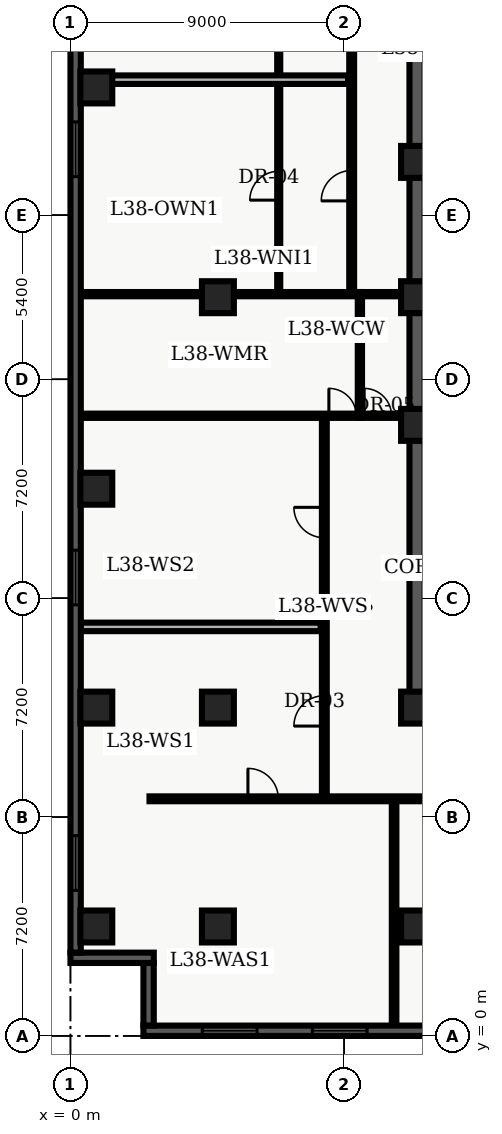
"""IFC4 building model, lengths in metres.
Left out: names, types, materials, properties, quantities, classifications, styles, units other than length and angle.
Written with IfcOpenShell. Run it as: python <this file> out.ifc"""

import sys

from ifc_helpers import new_model, entity, si_unit, converted_unit, direction, frame, origin_with_axes, origin_2d_with_axis, place, context, subcontext, project, spatial, polyline, rectangle, outline, extrude, element, fill, save


model = new_model("IFC4")
c1 = context("Model", 3, precision=1e-05, world=origin_with_axes(), true_north=direction((0.0, 1.0)))
c2 = subcontext(c1, "Body", "Model", "MODEL_VIEW")
j1 = project(units=[si_unit("LENGTHUNIT", "METRE"), converted_unit("PLANEANGLEUNIT", "DEGREE", entity("IfcPlaneAngleMeasure", 0.017), si_unit("PLANEANGLEUNIT", "RADIAN"), dimensions=[0, 0, 0, 0, 0, 0, 0])], contexts=[c1])
p1 = place(None, origin_with_axes())
s1 = spatial("IfcSite", under=j1, at=p1, CompositionType="ELEMENT")
p2 = place(p1, origin_with_axes())
s2 = spatial("IfcBuilding", under=s1, at=p2, CompositionType="ELEMENT")
p3 = place(p2, frame((0.0, 0.0, 156.3), z_axis=(0.0, 0.0, 1.0), x_axis=(1.0, 0.0, 0.0)))
s3 = spatial("IfcBuildingStorey", under=s2, at=p3, CompositionType="ELEMENT", Elevation=156.3)
p4 = place(p3, frame((11.4, 10.8, 0.0), z_axis=(0.0, 0.0, 1.0), x_axis=(0.0, 1.0, 0.0)))
e1 = element("IfcWall", 1, at=p4, inside=s3, PredefinedType="SHEAR", context=c2, shape_type="SweptSolid", body=[
    extrude(outline(polyline([(0.0, -0.25), (27.0, -0.25), (27.0, 0.25), (0.0, 0.25), (0.0, -0.25)])), origin_with_axes(), (0.0, 0.0, 1.0), 3.66),
])
p5 = place(p3, frame((11.4, 10.8, 0.0), z_axis=(0.0, 0.0, 1.0), x_axis=(1.0, 0.0, 0.0)))
e2 = element("IfcWall", 2, at=p5, inside=s3, PredefinedType="SHEAR", context=c2, shape_type="SweptSolid", body=[
    extrude(outline(polyline([(0.0, -0.25), (7.2, -0.25), (7.2, 0.25), (0.0, 0.25), (0.0, -0.25)])), origin_with_axes(), (0.0, 0.0, 1.0), 3.66),
])
p6 = place(p5, frame((2.625, 0.0, 0.0), z_axis=(0.0, 0.0, 1.0), x_axis=(1.0, 0.0, 0.0)))
e3 = element("IfcOpeningElement", 3, at=p6, cuts=e2, PredefinedType="OPENING", context=c2, shape_type="SweptSolid", body=[
    extrude(rectangle(XDim=1.05, YDim=0.52, at=origin_2d_with_axis()), origin_with_axes(), (0.0, 0.0, 1.0), 2.15),
])
for number, where, z_axis, x_axis in (
    (4, (11.4, 3.6, 0.0), (0.0, 0.0, 1.0), (1.0, 0.0, 0.0)),
    (5, (11.4, 10.8, 0.0), (0.0, 0.0, 1.0), (1.0, 0.0, 0.0)),
    (6, (11.4, 20.1, 0.0), (0.0, 0.0, 1.0), (1.0, 0.0, 0.0)),
    (7, (11.4, 24.3, 0.0), (0.0, 0.0, 1.0), (1.0, 0.0, 0.0)),
    (8, (11.4, 28.75, 0.0), (0.0, 0.0, 1.0), (1.0, 0.0, 0.0)),
    (9, (4.85, 3.6, 0.0), (0.0, 0.0, 1.0), (1.0, 0.0, 0.0)),
    (10, (4.85, 10.8, 0.0), (0.0, 0.0, 1.0), (1.0, 0.0, 0.0)),
    (11, (4.85, 24.3, 0.0), (0.0, 0.0, 1.0), (1.0, 0.0, 0.0)),
    (12, (0.85, 3.6, 0.0), (0.0, 0.0, 1.0), (1.0, 0.0, 0.0)),
    (13, (0.85, 10.8, 0.0), (0.0, 0.0, 1.0), (1.0, 0.0, 0.0)),
    (14, (0.85, 18.0, 0.0), (0.0, 0.0, 1.0), (1.0, 0.0, 0.0)),
    (15, (0.85, 31.2, 0.0), (0.0, 0.0, 1.0), (1.0, 0.0, 0.0)),
):
    element("IfcColumn", number, at=place(p3, frame(where, z_axis=z_axis, x_axis=x_axis)), inside=s3, PredefinedType="COLUMN", context=c2, shape_type="SweptSolid", body=[
        extrude(rectangle(XDim=1.05, YDim=1.05, at=origin_2d_with_axis()), origin_with_axes(), (0.0, 0.0, 1.0), 3.9),
    ])
p7 = place(p3, frame((9.52, 20.4, 0.0), z_axis=(0.0, 0.0, 1.0), x_axis=(0.0, 1.0, 0.0)))
e16 = element("IfcWall", 16, at=p7, inside=s3, PredefinedType="PARTITIONING", context=c2, shape_type="SweptSolid", body=[
    extrude(outline(polyline([(0.0, -0.07), (4.0, -0.07), (4.0, 0.07), (0.0, 0.07), (0.0, -0.07)])), origin_with_axes(), (0.0, 0.0, 1.0), 2.7),
])
p8 = place(p3, frame((9.52, 20.4, 0.0), z_axis=(0.0, 0.0, 1.0), x_axis=(1.0, 0.0, 0.0)))
e17 = element("IfcWall", 17, at=p8, inside=s3, PredefinedType="PARTITIONING", context=c2, shape_type="SweptSolid", body=[
    extrude(outline(polyline([(0.0, -0.07), (1.58, -0.07), (1.58, 0.07), (0.0, 0.07), (0.0, -0.07)])), origin_with_axes(), (0.0, 0.0, 1.0), 2.7),
])
p9 = place(p8, frame((0.59, 0.0, 0.0), z_axis=(0.0, 0.0, 1.0), x_axis=(1.0, 0.0, 0.0)))
e18 = element("IfcOpeningElement", 18, at=p9, cuts=e17, PredefinedType="OPENING", context=c2, shape_type="SweptSolid", body=[
    extrude(rectangle(XDim=0.9, YDim=0.16, at=origin_2d_with_axis()), origin_with_axes(), (0.0, 0.0, 1.0), 2.15),
])
p10 = place(p3, frame((9.52, 24.4, 0.0), z_axis=(0.0, 0.0, 1.0), x_axis=(1.0, 0.0, 0.0)))
e19 = element("IfcWall", 19, at=p10, inside=s3, PredefinedType="PARTITIONING", context=c2, shape_type="SweptSolid", body=[
    extrude(outline(polyline([(0.0, -0.07), (1.58, -0.07), (1.58, 0.07), (0.0, 0.07), (0.0, -0.07)])), origin_with_axes(), (0.0, 0.0, 1.0), 2.7),
])
p11 = place(p3, frame((2.6, 7.8, 0.0), z_axis=(0.0, 0.0, 1.0), x_axis=(1.0, 0.0, 0.0)))
e20 = element("IfcWall", 20, at=p11, inside=s3, PredefinedType="PARTITIONING", context=c2, shape_type="SweptSolid", body=[
    extrude(outline(polyline([(0.0, -0.08), (18.55, -0.08), (18.55, 0.08), (0.0, 0.08), (0.0, -0.08)])), origin_with_axes(), (0.0, 0.0, 1.0), 2.7),
])
p12 = place(p11, frame((3.737, 0.0, 0.0), z_axis=(0.0, 0.0, 1.0), x_axis=(1.0, 0.0, 0.0)))
e21 = element("IfcOpeningElement", 21, at=p12, cuts=e20, PredefinedType="OPENING", context=c2, shape_type="SweptSolid", body=[
    extrude(rectangle(XDim=1.0, YDim=0.18, at=origin_2d_with_axis()), origin_with_axes(), (0.0, 0.0, 1.0), 2.15),
])
p13 = place(p11, frame((13.273, 0.0, 0.0), z_axis=(0.0, 0.0, 1.0), x_axis=(1.0, 0.0, 0.0)))
e22 = element("IfcOpeningElement", 22, at=p13, cuts=e20, PredefinedType="OPENING", context=c2, shape_type="SweptSolid", body=[
    extrude(rectangle(XDim=1.0, YDim=0.18, at=origin_2d_with_axis()), origin_with_axes(), (0.0, 0.0, 1.0), 2.15),
])
p14 = place(p3, frame((8.35, 7.8, 0.0), z_axis=(0.0, 0.0, 1.0), x_axis=(0.0, 1.0, 0.0)))
e23 = element("IfcWall", 23, at=p14, inside=s3, PredefinedType="PARTITIONING", context=c2, shape_type="SweptSolid", body=[
    extrude(outline(polyline([(0.0, -0.08), (12.6, -0.08), (12.6, 0.08), (0.0, 0.08), (0.0, -0.08)])), origin_with_axes(), (0.0, 0.0, 1.0), 2.7),
])
p15 = place(p14, frame((2.893, 0.0, 0.0), z_axis=(0.0, 0.0, 1.0), x_axis=(1.0, 0.0, 0.0)))
e24 = element("IfcOpeningElement", 24, at=p15, cuts=e23, PredefinedType="OPENING", context=c2, shape_type="SweptSolid", body=[
    extrude(rectangle(XDim=1.0, YDim=0.18, at=origin_2d_with_axis()), origin_with_axes(), (0.0, 0.0, 1.0), 2.15),
])
p16 = place(p14, frame((9.088, 0.0, 0.0), z_axis=(0.0, 0.0, 1.0), x_axis=(1.0, 0.0, 0.0)))
e25 = element("IfcOpeningElement", 25, at=p16, cuts=e23, PredefinedType="OPENING", context=c2, shape_type="SweptSolid", body=[
    extrude(rectangle(XDim=1.0, YDim=0.18, at=origin_2d_with_axis()), origin_with_axes(), (0.0, 0.0, 1.0), 2.15),
])
p17 = place(p3, frame((9.25, 24.4, 0.0), z_axis=(0.0, 0.0, 1.0), x_axis=(0.0, 1.0, 0.0)))
e26 = element("IfcWall", 26, at=p17, inside=s3, PredefinedType="PARTITIONING", context=c2, shape_type="SweptSolid", body=[
    extrude(outline(polyline([(0.0, -0.08), (16.1, -0.08), (16.1, 0.08), (0.0, 0.08), (0.0, -0.08)])), origin_with_axes(), (0.0, 0.0, 1.0), 2.7),
])
p18 = place(p17, frame((3.567, 0.0, 0.0), z_axis=(0.0, 0.0, 1.0), x_axis=(1.0, 0.0, 0.0)))
e27 = element("IfcOpeningElement", 27, at=p18, cuts=e26, PredefinedType="OPENING", context=c2, shape_type="SweptSolid", body=[
    extrude(rectangle(XDim=1.0, YDim=0.18, at=origin_2d_with_axis()), origin_with_axes(), (0.0, 0.0, 1.0), 2.15),
])
p19 = place(p17, frame((11.512, 0.0, 0.0), z_axis=(0.0, 0.0, 1.0), x_axis=(1.0, 0.0, 0.0)))
e28 = element("IfcOpeningElement", 28, at=p19, cuts=e26, PredefinedType="OPENING", context=c2, shape_type="SweptSolid", body=[
    extrude(rectangle(XDim=1.0, YDim=0.18, at=origin_2d_with_axis()), origin_with_axes(), (0.0, 0.0, 1.0), 2.15),
])
p20 = place(p3, frame((0.335, 20.4, 0.0), z_axis=(0.0, 0.0, 1.0), x_axis=(1.0, 0.0, 0.0)))
e29 = element("IfcWall", 29, at=p20, inside=s3, PredefinedType="PARTITIONING", context=c2, shape_type="SweptSolid", body=[
    extrude(outline(polyline([(0.0, -0.07), (9.185, -0.07), (9.185, 0.07), (0.0, 0.07), (0.0, -0.07)])), origin_with_axes(), (0.0, 0.0, 1.0), 2.7),
])
p21 = place(p20, frame((8.615, 0.0, 0.0), z_axis=(0.0, 0.0, 1.0), x_axis=(1.0, 0.0, 0.0)))
e30 = element("IfcOpeningElement", 30, at=p21, cuts=e29, PredefinedType="OPENING", context=c2, shape_type="SweptSolid", body=[
    extrude(rectangle(XDim=0.9, YDim=0.16, at=origin_2d_with_axis()), origin_with_axes(), (0.0, 0.0, 1.0), 2.15),
])
p22 = place(p3, frame((0.335, 24.4, 0.0), z_axis=(0.0, 0.0, 1.0), x_axis=(1.0, 0.0, 0.0)))
e31 = element("IfcWall", 31, at=p22, inside=s3, PredefinedType="PARTITIONING", context=c2, shape_type="SweptSolid", body=[
    extrude(outline(polyline([(0.0, -0.07), (9.185, -0.07), (9.185, 0.07), (0.0, 0.07), (0.0, -0.07)])), origin_with_axes(), (0.0, 0.0, 1.0), 2.7),
])
p23 = place(p3, frame((0.335, 13.455, 0.0), z_axis=(0.0, 0.0, 1.0), x_axis=(1.0, 0.0, 0.0)))
e32 = element("IfcWall", 32, at=p23, inside=s3, PredefinedType="PARTITIONING", context=c2, shape_type="SweptSolid", body=[
    extrude(outline(polyline([(0.0, -0.14), (7.895, -0.14), (7.895, 0.14), (0.0, 0.14), (0.0, -0.14)])), origin_with_axes(), (0.0, 0.0, 1.0), 2.7),
])
p24 = place(p3, frame((6.85, 24.55, 0.0), z_axis=(0.0, 0.0, 1.0), x_axis=(0.0, 1.0, 0.0)))
e33 = element("IfcWall", 33, at=p24, inside=s3, PredefinedType="PARTITIONING", context=c2, shape_type="SweptSolid", body=[
    extrude(outline(polyline([(0.0, -0.05), (15.75, -0.05), (15.75, 0.05), (0.0, 0.05), (0.0, -0.05)])), origin_with_axes(), (0.0, 0.0, 1.0), 2.7),
])
p25 = place(p24, frame((3.417, 0.0, 0.0), z_axis=(0.0, 0.0, 1.0), x_axis=(1.0, 0.0, 0.0)))
e34 = element("IfcOpeningElement", 34, at=p25, cuts=e33, PredefinedType="OPENING", context=c2, shape_type="SweptSolid", body=[
    extrude(rectangle(XDim=0.95, YDim=0.12, at=origin_2d_with_axis()), origin_with_axes(), (0.0, 0.0, 1.0), 2.15),
])
p26 = place(p24, frame((11.082, 0.0, 0.0), z_axis=(0.0, 0.0, 1.0), x_axis=(1.0, 0.0, 0.0)))
e35 = element("IfcOpeningElement", 35, at=p26, cuts=e33, PredefinedType="OPENING", context=c2, shape_type="SweptSolid", body=[
    extrude(rectangle(XDim=0.95, YDim=0.12, at=origin_2d_with_axis()), origin_with_axes(), (0.0, 0.0, 1.0), 2.15),
])
p27 = place(p3, frame((0.335, 31.455, 0.0), z_axis=(0.0, 0.0, 1.0), x_axis=(1.0, 0.0, 0.0)))
e36 = element("IfcWall", 36, at=p27, inside=s3, PredefinedType="PARTITIONING", context=c2, shape_type="SweptSolid", body=[
    extrude(outline(polyline([(0.0, -0.14), (8.795, -0.14), (8.795, 0.14), (0.0, 0.14), (0.0, -0.14)])), origin_with_axes(), (0.0, 0.0, 1.0), 2.7),
])
p28 = place(p3, frame((10.645, 0.335, 0.0), z_axis=(0.0, 0.0, 1.0), x_axis=(0.0, 1.0, 0.0)))
e37 = element("IfcWall", 37, at=p28, inside=s3, PredefinedType="PARTITIONING", context=c2, shape_type="SweptSolid", body=[
    extrude(outline(polyline([(0.0, -0.075), (7.365, -0.075), (7.365, 0.075), (0.0, 0.075), (0.0, -0.075)])), origin_with_axes(), (0.0, 0.0, 1.0), 2.7),
])
p29 = place(p3, frame((57.26, 0.17, 0.0), z_axis=(0.0, 0.0, 1.0), x_axis=(-1.0, 0.0, 0.0)))
e38 = element("IfcWall", 38, at=p29, inside=s3, PredefinedType="SOLIDWALL", context=c2, shape_type="SweptSolid", body=[
    extrude(outline(polyline([(0.0, -0.17), (54.86, -0.17), (54.86, 0.17), (0.0, 0.17), (0.0, -0.17)])), origin_with_axes(), (0.0, 0.0, 1.0), 3.66),
])
p30 = place(p29, frame((2.836, 0.0, 0.45), z_axis=(0.0, 0.0, 1.0), x_axis=(1.0, 0.0, 0.0)))
e39 = element("IfcOpeningElement", 39, at=p30, cuts=e38, PredefinedType="OPENING", context=c2, shape_type="SweptSolid", body=[
    extrude(rectangle(XDim=1.8, YDim=0.36, at=origin_2d_with_axis()), origin_with_axes(), (0.0, 0.0, 1.0), 2.1),
])
p31 = place(p29, frame((7.307, 0.0, 0.45), z_axis=(0.0, 0.0, 1.0), x_axis=(1.0, 0.0, 0.0)))
e40 = element("IfcOpeningElement", 40, at=p31, cuts=e38, PredefinedType="OPENING", context=c2, shape_type="SweptSolid", body=[
    extrude(rectangle(XDim=1.8, YDim=0.36, at=origin_2d_with_axis()), origin_with_axes(), (0.0, 0.0, 1.0), 2.1),
])
p32 = place(p29, frame((11.779, 0.0, 0.45), z_axis=(0.0, 0.0, 1.0), x_axis=(1.0, 0.0, 0.0)))
e41 = element("IfcOpeningElement", 41, at=p32, cuts=e38, PredefinedType="OPENING", context=c2, shape_type="SweptSolid", body=[
    extrude(rectangle(XDim=1.8, YDim=0.36, at=origin_2d_with_axis()), origin_with_axes(), (0.0, 0.0, 1.0), 2.1),
])
p33 = place(p29, frame((16.251, 0.0, 0.45), z_axis=(0.0, 0.0, 1.0), x_axis=(1.0, 0.0, 0.0)))
e42 = element("IfcOpeningElement", 42, at=p33, cuts=e38, PredefinedType="OPENING", context=c2, shape_type="SweptSolid", body=[
    extrude(rectangle(XDim=1.8, YDim=0.36, at=origin_2d_with_axis()), origin_with_axes(), (0.0, 0.0, 1.0), 2.1),
])
p34 = place(p29, frame((20.723, 0.0, 0.45), z_axis=(0.0, 0.0, 1.0), x_axis=(1.0, 0.0, 0.0)))
e43 = element("IfcOpeningElement", 43, at=p34, cuts=e38, PredefinedType="OPENING", context=c2, shape_type="SweptSolid", body=[
    extrude(rectangle(XDim=1.8, YDim=0.36, at=origin_2d_with_axis()), origin_with_axes(), (0.0, 0.0, 1.0), 2.1),
])
p35 = place(p29, frame((25.194, 0.0, 0.45), z_axis=(0.0, 0.0, 1.0), x_axis=(1.0, 0.0, 0.0)))
e44 = element("IfcOpeningElement", 44, at=p35, cuts=e38, PredefinedType="OPENING", context=c2, shape_type="SweptSolid", body=[
    extrude(rectangle(XDim=1.8, YDim=0.36, at=origin_2d_with_axis()), origin_with_axes(), (0.0, 0.0, 1.0), 2.1),
])
p36 = place(p29, frame((29.666, 0.0, 0.45), z_axis=(0.0, 0.0, 1.0), x_axis=(1.0, 0.0, 0.0)))
e45 = element("IfcOpeningElement", 45, at=p36, cuts=e38, PredefinedType="OPENING", context=c2, shape_type="SweptSolid", body=[
    extrude(rectangle(XDim=1.8, YDim=0.36, at=origin_2d_with_axis()), origin_with_axes(), (0.0, 0.0, 1.0), 2.1),
])
p37 = place(p29, frame((34.138, 0.0, 0.45), z_axis=(0.0, 0.0, 1.0), x_axis=(1.0, 0.0, 0.0)))
e46 = element("IfcOpeningElement", 46, at=p37, cuts=e38, PredefinedType="OPENING", context=c2, shape_type="SweptSolid", body=[
    extrude(rectangle(XDim=1.8, YDim=0.36, at=origin_2d_with_axis()), origin_with_axes(), (0.0, 0.0, 1.0), 2.1),
])
p38 = place(p29, frame((38.609, 0.0, 0.45), z_axis=(0.0, 0.0, 1.0), x_axis=(1.0, 0.0, 0.0)))
e47 = element("IfcOpeningElement", 47, at=p38, cuts=e38, PredefinedType="OPENING", context=c2, shape_type="SweptSolid", body=[
    extrude(rectangle(XDim=1.8, YDim=0.36, at=origin_2d_with_axis()), origin_with_axes(), (0.0, 0.0, 1.0), 2.1),
])
p39 = place(p29, frame((43.081, 0.0, 0.45), z_axis=(0.0, 0.0, 1.0), x_axis=(1.0, 0.0, 0.0)))
e48 = element("IfcOpeningElement", 48, at=p39, cuts=e38, PredefinedType="OPENING", context=c2, shape_type="SweptSolid", body=[
    extrude(rectangle(XDim=1.8, YDim=0.36, at=origin_2d_with_axis()), origin_with_axes(), (0.0, 0.0, 1.0), 2.1),
])
p40 = place(p29, frame((48.403, 0.0, 0.45), z_axis=(0.0, 0.0, 1.0), x_axis=(1.0, 0.0, 0.0)))
e49 = element("IfcOpeningElement", 49, at=p40, cuts=e38, PredefinedType="OPENING", context=c2, shape_type="SweptSolid", body=[
    extrude(rectangle(XDim=1.8, YDim=0.36, at=origin_2d_with_axis()), origin_with_axes(), (0.0, 0.0, 1.0), 2.1),
])
p41 = place(p29, frame((52.024, 0.0, 0.45), z_axis=(0.0, 0.0, 1.0), x_axis=(1.0, 0.0, 0.0)))
e50 = element("IfcOpeningElement", 50, at=p41, cuts=e38, PredefinedType="OPENING", context=c2, shape_type="SweptSolid", body=[
    extrude(rectangle(XDim=1.8, YDim=0.36, at=origin_2d_with_axis()), origin_with_axes(), (0.0, 0.0, 1.0), 2.1),
])
p42 = place(p3, frame((2.57, 0.34, 0.0), z_axis=(0.0, 0.0, 1.0), x_axis=(0.0, 1.0, 0.0)))
e51 = element("IfcWall", 51, at=p42, inside=s3, PredefinedType="SOLIDWALL", context=c2, shape_type="SweptSolid", body=[
    extrude(outline(polyline([(0.0, -0.17), (2.06, -0.17), (2.06, 0.17), (0.0, 0.17), (0.0, -0.17)])), origin_with_axes(), (0.0, 0.0, 1.0), 3.66),
])
p43 = place(p3, frame((2.74, 2.57, 0.0), z_axis=(0.0, 0.0, 1.0), x_axis=(-1.0, 0.0, 0.0)))
e52 = element("IfcWall", 52, at=p43, inside=s3, PredefinedType="SOLIDWALL", context=c2, shape_type="SweptSolid", body=[
    extrude(outline(polyline([(0.0, -0.17), (2.74, -0.17), (2.74, 0.17), (0.0, 0.17), (0.0, -0.17)])), origin_with_axes(), (0.0, 0.0, 1.0), 3.66),
])
p44 = place(p3, frame((0.17, 2.74, 0.0), z_axis=(0.0, 0.0, 1.0), x_axis=(0.0, 1.0, 0.0)))
e53 = element("IfcWall", 53, at=p44, inside=s3, PredefinedType="SOLIDWALL", context=c2, shape_type="SweptSolid", body=[
    extrude(outline(polyline([(0.0, -0.17), (43.46, -0.17), (43.46, 0.17), (0.0, 0.17), (0.0, -0.17)])), origin_with_axes(), (0.0, 0.0, 1.0), 3.66),
])
p45 = place(p44, frame((2.948, 0.0, 0.45), z_axis=(0.0, 0.0, 1.0), x_axis=(1.0, 0.0, 0.0)))
e54 = element("IfcOpeningElement", 54, at=p45, cuts=e53, PredefinedType="OPENING", context=c2, shape_type="SweptSolid", body=[
    extrude(rectangle(XDim=1.8, YDim=0.36, at=origin_2d_with_axis()), origin_with_axes(), (0.0, 0.0, 1.0), 2.1),
])
p46 = place(p44, frame((12.339, 0.0, 0.45), z_axis=(0.0, 0.0, 1.0), x_axis=(1.0, 0.0, 0.0)))
e55 = element("IfcOpeningElement", 55, at=p46, cuts=e53, PredefinedType="OPENING", context=c2, shape_type="SweptSolid", body=[
    extrude(rectangle(XDim=1.8, YDim=0.36, at=origin_2d_with_axis()), origin_with_axes(), (0.0, 0.0, 1.0), 2.1),
])
p47 = place(p44, frame((26.426, 0.0, 0.45), z_axis=(0.0, 0.0, 1.0), x_axis=(1.0, 0.0, 0.0)))
e56 = element("IfcOpeningElement", 56, at=p47, cuts=e53, PredefinedType="OPENING", context=c2, shape_type="SweptSolid", body=[
    extrude(rectangle(XDim=1.8, YDim=0.36, at=origin_2d_with_axis()), origin_with_axes(), (0.0, 0.0, 1.0), 2.1),
])
p48 = place(p44, frame((31.121, 0.0, 0.45), z_axis=(0.0, 0.0, 1.0), x_axis=(1.0, 0.0, 0.0)))
e57 = element("IfcOpeningElement", 57, at=p48, cuts=e53, PredefinedType="OPENING", context=c2, shape_type="SweptSolid", body=[
    extrude(rectangle(XDim=1.8, YDim=0.36, at=origin_2d_with_axis()), origin_with_axes(), (0.0, 0.0, 1.0), 2.1),
])
p49 = place(p44, frame((40.062, 0.0, 0.45), z_axis=(0.0, 0.0, 1.0), x_axis=(1.0, 0.0, 0.0)))
e58 = element("IfcOpeningElement", 58, at=p49, cuts=e53, PredefinedType="OPENING", context=c2, shape_type="SweptSolid", body=[
    extrude(rectangle(XDim=1.8, YDim=0.36, at=origin_2d_with_axis()), origin_with_axes(), (0.0, 0.0, 1.0), 2.1),
])
p50 = place(p8, frame((0.59, 0.0, 0.0), z_axis=(0.0, 0.0, 1.0), x_axis=(1.0, 0.0, 0.0)))
e59 = element("IfcDoor", 59, at=p50, inside=s3, OperationType="SINGLE_SWING_LEFT", PredefinedType="DOOR", context=c2, shape_type="SweptSolid", body=[
    extrude(rectangle(XDim=0.9, YDim=0.084, at=origin_2d_with_axis()), origin_with_axes(), (0.0, 0.0, 1.0), 2.15),
])
fill(e18, e59)
p51 = place(p20, frame((8.615, 0.0, 0.0), z_axis=(0.0, 0.0, 1.0), x_axis=(1.0, 0.0, 0.0)))
e60 = element("IfcDoor", 60, at=p51, inside=s3, OperationType="SINGLE_SWING_LEFT", PredefinedType="DOOR", context=c2, shape_type="SweptSolid", body=[
    extrude(rectangle(XDim=0.9, YDim=0.084, at=origin_2d_with_axis()), origin_with_axes(), (0.0, 0.0, 1.0), 2.15),
])
fill(e30, e60)
p52 = place(p14, frame((2.893, 0.0, 0.0), z_axis=(0.0, 0.0, 1.0), x_axis=(1.0, 0.0, 0.0)))
e61 = element("IfcDoor", 61, at=p52, inside=s3, OperationType="SINGLE_SWING_LEFT", PredefinedType="DOOR", context=c2, shape_type="SweptSolid", body=[
    extrude(rectangle(XDim=1.0, YDim=0.09, at=origin_2d_with_axis()), origin_with_axes(), (0.0, 0.0, 1.0), 2.15),
])
fill(e24, e61)
p53 = place(p14, frame((9.088, 0.0, 0.0), z_axis=(0.0, 0.0, 1.0), x_axis=(1.0, 0.0, 0.0)))
e62 = element("IfcDoor", 62, at=p53, inside=s3, OperationType="SINGLE_SWING_RIGHT", PredefinedType="DOOR", context=c2, shape_type="SweptSolid", body=[
    extrude(rectangle(XDim=1.0, YDim=0.09, at=origin_2d_with_axis()), origin_with_axes(), (0.0, 0.0, 1.0), 2.15),
])
fill(e25, e62)
p54 = place(p24, frame((3.417, 0.0, 0.0), z_axis=(0.0, 0.0, 1.0), x_axis=(1.0, 0.0, 0.0)))
e63 = element("IfcDoor", 63, at=p54, inside=s3, OperationType="SINGLE_SWING_LEFT", PredefinedType="DOOR", context=c2, shape_type="SweptSolid", body=[
    extrude(rectangle(XDim=0.95, YDim=0.06, at=origin_2d_with_axis()), origin_with_axes(), (0.0, 0.0, 1.0), 2.15),
])
fill(e34, e63)
p55 = place(p17, frame((3.567, 0.0, 0.0), z_axis=(0.0, 0.0, 1.0), x_axis=(1.0, 0.0, 0.0)))
e64 = element("IfcDoor", 64, at=p55, inside=s3, OperationType="SINGLE_SWING_LEFT", PredefinedType="DOOR", context=c2, shape_type="SweptSolid", body=[
    extrude(rectangle(XDim=1.0, YDim=0.09, at=origin_2d_with_axis()), origin_with_axes(), (0.0, 0.0, 1.0), 2.15),
])
fill(e27, e64)
p56 = place(p11, frame((3.737, 0.0, 0.0), z_axis=(0.0, 0.0, 1.0), x_axis=(1.0, 0.0, 0.0)))
e65 = element("IfcDoor", 65, at=p56, inside=s3, OperationType="SINGLE_SWING_LEFT", PredefinedType="DOOR", context=c2, shape_type="SweptSolid", body=[
    extrude(rectangle(XDim=1.0, YDim=0.09, at=origin_2d_with_axis()), origin_with_axes(), (0.0, 0.0, 1.0), 2.15),
])
fill(e21, e65)
p57 = place(p29, frame((48.403, 0.0, 0.45), z_axis=(0.0, 0.0, 1.0), x_axis=(1.0, 0.0, 0.0)))
e66 = element("IfcWindow", 66, at=p57, inside=s3, PredefinedType="WINDOW", context=c2, shape_type="SweptSolid", body=[
    extrude(rectangle(XDim=1.8, YDim=0.09, at=origin_2d_with_axis()), origin_with_axes(), (0.0, 0.0, 1.0), 2.1),
])
fill(e49, e66)
p58 = place(p29, frame((52.024, 0.0, 0.45), z_axis=(0.0, 0.0, 1.0), x_axis=(1.0, 0.0, 0.0)))
e67 = element("IfcWindow", 67, at=p58, inside=s3, PredefinedType="WINDOW", context=c2, shape_type="SweptSolid", body=[
    extrude(rectangle(XDim=1.8, YDim=0.09, at=origin_2d_with_axis()), origin_with_axes(), (0.0, 0.0, 1.0), 2.1),
])
fill(e50, e67)
p59 = place(p44, frame((2.948, 0.0, 0.45), z_axis=(0.0, 0.0, 1.0), x_axis=(1.0, 0.0, 0.0)))
e68 = element("IfcWindow", 68, at=p59, inside=s3, PredefinedType="WINDOW", context=c2, shape_type="SweptSolid", body=[
    extrude(rectangle(XDim=1.8, YDim=0.09, at=origin_2d_with_axis()), origin_with_axes(), (0.0, 0.0, 1.0), 2.1),
])
fill(e54, e68)
p60 = place(p44, frame((12.339, 0.0, 0.45), z_axis=(0.0, 0.0, 1.0), x_axis=(1.0, 0.0, 0.0)))
e69 = element("IfcWindow", 69, at=p60, inside=s3, PredefinedType="WINDOW", context=c2, shape_type="SweptSolid", body=[
    extrude(rectangle(XDim=1.8, YDim=0.09, at=origin_2d_with_axis()), origin_with_axes(), (0.0, 0.0, 1.0), 2.1),
])
fill(e55, e69)
p61 = place(p44, frame((26.426, 0.0, 0.45), z_axis=(0.0, 0.0, 1.0), x_axis=(1.0, 0.0, 0.0)))
e70 = element("IfcWindow", 70, at=p61, inside=s3, PredefinedType="WINDOW", context=c2, shape_type="SweptSolid", body=[
    extrude(rectangle(XDim=1.8, YDim=0.09, at=origin_2d_with_axis()), origin_with_axes(), (0.0, 0.0, 1.0), 2.1),
])
fill(e56, e70)
save(model, sys.argv[1])
